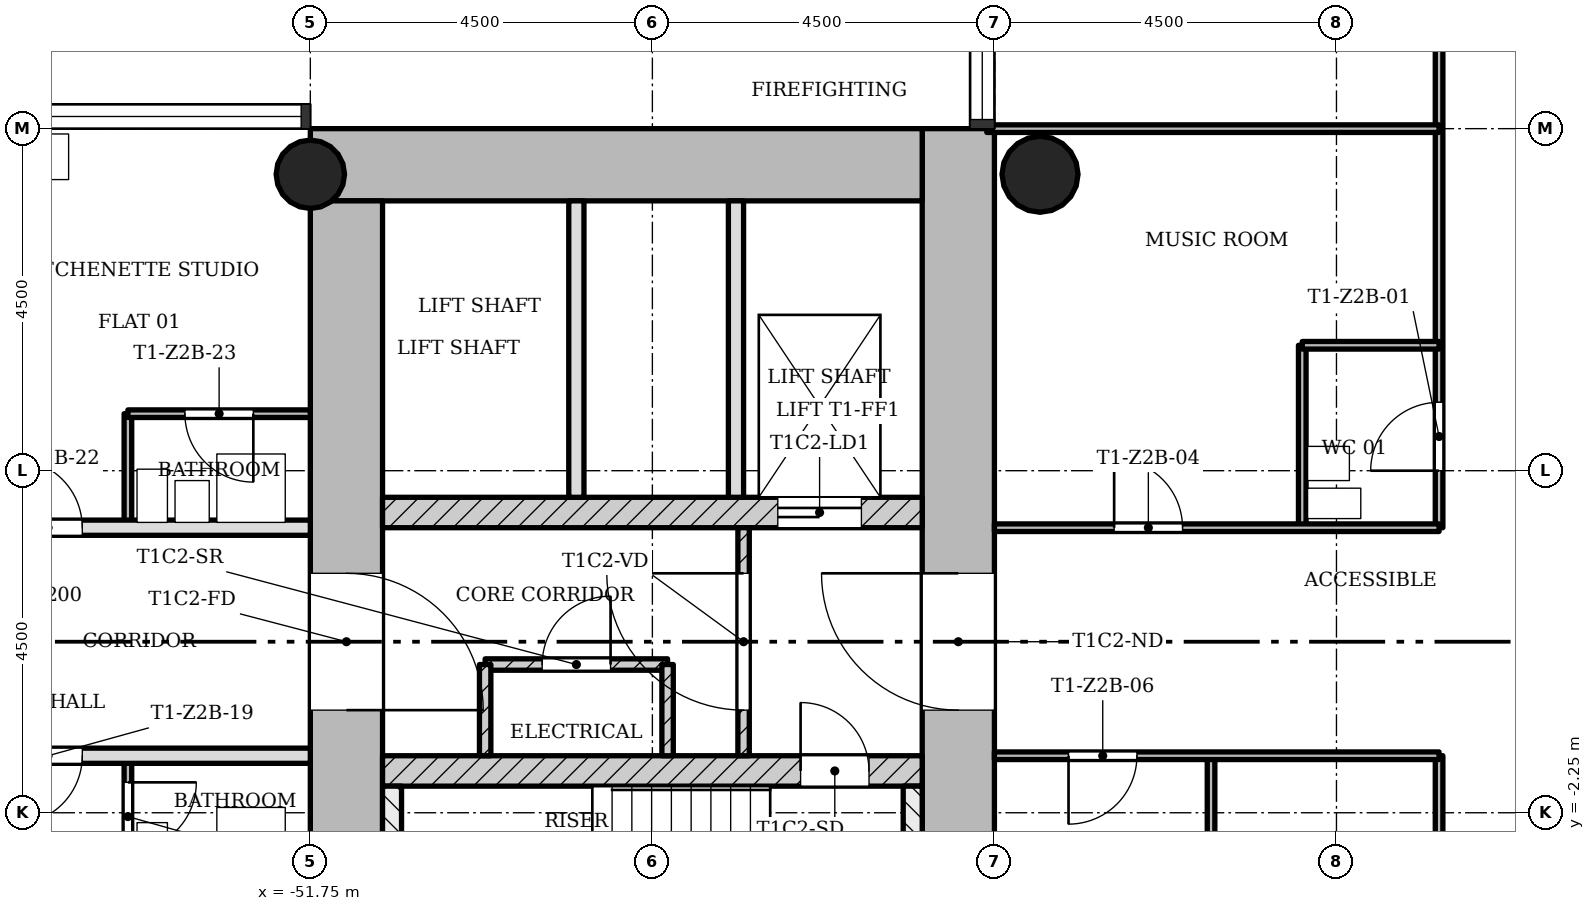
"""IFC4 building model, lengths in metres.
Left out: names, types, materials, properties, quantities, classifications, styles, units other than length and angle.
Written with IfcOpenShell. Run it as: python <this file> out.ifc"""

import sys

from ifc_helpers import new_model, si_unit, direction, frame, frame_2d, origin, origin_2d, place, context, subcontext, project, spatial, rectangle, hollow_circle, extrude, element, fill, save


model = new_model("IFC4")
c1 = context("Model", 3, precision=1e-05, world=origin(), true_north=direction((0.0, 1.0)))
c2 = subcontext(c1, "Body", "Model", "MODEL_VIEW")
j1 = project(units=[si_unit("LENGTHUNIT", "METRE"), si_unit("PLANEANGLEUNIT", "RADIAN")], contexts=[c1])
p1 = place(None, origin())
s1 = spatial("IfcSite", under=j1, at=p1, CompositionType="ELEMENT")
p2 = place(p1, origin())
s2 = spatial("IfcBuilding", under=s1, at=p2, CompositionType="ELEMENT")
p3 = place(p2, frame((0.0, 0.0, 76.6)))
s3 = spatial("IfcBuildingStorey", under=s2, at=p3, CompositionType="ELEMENT", Elevation=76.6)
p4 = place(p3, frame((-43.225, -5.8, 0.0), z_axis=(0.0, 0.0, 1.0), x_axis=(0.0, 1.0, 0.0)))
e1 = element("IfcWall", 1, at=p4, inside=s3, PredefinedType="SHEAR", context=c2, shape_type="SweptSolid", body=[
    extrude(rectangle(XDim=12.55, YDim=0.95, at=frame_2d((6.275, 0.0))), origin(), (0.0, 0.0, 1.0), 3.4),
])
p5 = place(p4, frame((4.9, 0.0, 0.0)))
e2 = element("IfcOpeningElement", 2, at=p5, cuts=e1, PredefinedType="OPENING", context=c2, shape_type="SweptSolid", body=[
    extrude(rectangle(XDim=1.8, YDim=2.1, at=frame_2d((0.9, 1.05))), frame((0.0, 0.485, 0.0), z_axis=(0.0, -1.0, 0.0), x_axis=(1.0, 0.0, 0.0)), (0.0, 0.0, 1.0), 0.97),
])
p6 = place(p3, frame((-43.7, 6.275, 0.0), z_axis=(0.0, 0.0, 1.0), x_axis=(-1.0, 0.0, 0.0)))
e3 = element("IfcWall", 3, at=p6, inside=s3, PredefinedType="SHEAR", context=c2, shape_type="SweptSolid", body=[
    extrude(rectangle(XDim=8.05, YDim=0.95, at=frame_2d((4.025, 0.0))), origin(), (0.0, 0.0, 1.0), 3.4),
])
p7 = place(p3, frame((-51.275, 5.8, 0.0), z_axis=(0.0, 0.0, 1.0), x_axis=(0.0, -1.0, 0.0)))
e4 = element("IfcWall", 4, at=p7, inside=s3, PredefinedType="SHEAR", context=c2, shape_type="SweptSolid", body=[
    extrude(rectangle(XDim=12.55, YDim=0.95, at=frame_2d((6.275, 0.0))), origin(), (0.0, 0.0, 1.0), 3.4),
])
p8 = place(p7, frame((4.9, 0.0, 0.0)))
e5 = element("IfcOpeningElement", 5, at=p8, cuts=e4, PredefinedType="OPENING", context=c2, shape_type="SweptSolid", body=[
    extrude(rectangle(XDim=1.8, YDim=2.1, at=frame_2d((0.9, 1.05))), frame((0.0, 0.485, 0.0), z_axis=(0.0, -1.0, 0.0), x_axis=(1.0, 0.0, 0.0)), (0.0, 0.0, 1.0), 0.97),
])
p9 = place(p3, frame((-50.8, -1.7, 0.0), z_axis=(0.0, 0.0, 1.0), x_axis=(1.0, 0.0, 0.0)))
e6 = element("IfcWall", 6, at=p9, inside=s3, PredefinedType="SHEAR", context=c2, shape_type="SweptSolid", body=[
    extrude(rectangle(XDim=7.1, YDim=0.4, at=frame_2d((3.55, 0.0))), origin(), (0.0, 0.0, 1.0), 3.4),
])
p10 = place(p9, frame((5.5, 0.0, 0.0)))
e7 = element("IfcOpeningElement", 7, at=p10, cuts=e6, PredefinedType="OPENING", context=c2, shape_type="SweptSolid", body=[
    extrude(rectangle(XDim=0.9, YDim=2.1, at=frame_2d((0.45, 1.05))), frame((0.0, 0.21, 0.0), z_axis=(0.0, -1.0, 0.0), x_axis=(1.0, 0.0, 0.0)), (0.0, 0.0, 1.0), 0.42),
])
p11 = place(p3, frame((-50.8, 1.7, 0.0), z_axis=(0.0, 0.0, 1.0), x_axis=(1.0, 0.0, 0.0)))
e8 = element("IfcWall", 8, at=p11, inside=s3, PredefinedType="SHEAR", context=c2, shape_type="SweptSolid", body=[
    extrude(rectangle(XDim=7.1, YDim=0.4, at=frame_2d((3.55, 0.0))), origin(), (0.0, 0.0, 1.0), 3.4),
])
p12 = place(p11, frame((5.2, 0.0, 0.0)))
e9 = element("IfcOpeningElement", 9, at=p12, cuts=e8, PredefinedType="OPENING", context=c2, shape_type="SweptSolid", body=[
    extrude(rectangle(XDim=1.1, YDim=2.1, at=frame_2d((0.55, 1.05))), frame((0.0, 0.21, 0.0), z_axis=(0.0, -1.0, 0.0), x_axis=(1.0, 0.0, 0.0)), (0.0, 0.0, 1.0), 0.42),
])
p13 = place(p3, frame((-51.75, 6.15, 0.0), z_axis=(0.0, 0.0, 1.0), x_axis=(1.0, 0.0, 0.0)))
e10 = element("IfcColumn", 10, at=p13, inside=s3, PredefinedType="COLUMN", context=c2, shape_type="SweptSolid", body=[
    extrude(hollow_circle(Radius=0.45, WallThickness=0.032, at=origin_2d()), origin(), (0.0, 0.0, 1.0), 3.4),
])
p14 = place(p3, frame((-42.15, 6.15, 0.0), z_axis=(0.0, 0.0, 1.0), x_axis=(1.0, 0.0, 0.0)))
e11 = element("IfcColumn", 11, at=p14, inside=s3, PredefinedType="COLUMN", context=c2, shape_type="SweptSolid", body=[
    extrude(hollow_circle(Radius=0.5, WallThickness=0.036, at=origin_2d()), origin(), (0.0, 0.0, 1.0), 3.4),
])
p15 = place(p3, frame((-46.05, 1.5, 0.0), z_axis=(0.0, 0.0, 1.0), x_axis=(0.0, -1.0, 0.0)))
e12 = element("IfcWall", 12, at=p15, inside=s3, PredefinedType="PARTITIONING", context=c2, shape_type="SweptSolid", body=[
    extrude(rectangle(XDim=3.0, YDim=0.15, at=frame_2d((1.5, 0.0))), origin(), (0.0, 0.0, 1.0), 3.0),
])
p16 = place(p15, frame((0.6, 0.0, 0.0)))
e13 = element("IfcOpeningElement", 13, at=p16, cuts=e12, PredefinedType="OPENING", context=c2, shape_type="SweptSolid", body=[
    extrude(rectangle(XDim=1.8, YDim=2.1, at=frame_2d((0.9, 1.05))), frame((0.0, 0.085, 0.0), z_axis=(0.0, -1.0, 0.0), x_axis=(1.0, 0.0, 0.0)), (0.0, 0.0, 1.0), 0.17),
])
for number, where, z_axis, x_axis in (
    (14, (-46.15, 5.8, 0.0), (0.0, 0.0, 1.0), (0.0, -1.0, 0.0)),
    (15, (-48.25, 5.8, 0.0), (0.0, 0.0, 1.0), (0.0, -1.0, 0.0)),
):
    element("IfcWall", number, at=place(p3, frame(where, z_axis=z_axis, x_axis=x_axis)), inside=s3, PredefinedType="SOLIDWALL", context=c2, shape_type="SweptSolid", body=[
        extrude(rectangle(XDim=3.9, YDim=0.2, at=frame_2d((1.95, 0.0))), origin(), (0.0, 0.0, 1.0), 3.0),
    ])
p17 = place(p3, frame((-47.05, -0.3, 0.0), z_axis=(0.0, 0.0, 1.0), x_axis=(-1.0, 0.0, 0.0)))
e16 = element("IfcWall", 16, at=p17, inside=s3, PredefinedType="PARTITIONING", context=c2, shape_type="SweptSolid", body=[
    extrude(rectangle(XDim=2.4, YDim=0.15, at=frame_2d((1.2, 0.0))), origin(), (0.0, 0.0, 1.0), 3.0),
])
p18 = place(p17, frame((0.75, 0.0, 0.0)))
e17 = element("IfcOpeningElement", 17, at=p18, cuts=e16, PredefinedType="OPENING", context=c2, shape_type="SweptSolid", body=[
    extrude(rectangle(XDim=0.9, YDim=2.1, at=frame_2d((0.45, 1.05))), frame((0.0, 0.085, 0.0), z_axis=(0.0, -1.0, 0.0), x_axis=(1.0, 0.0, 0.0)), (0.0, 0.0, 1.0), 0.17),
])
for number, where, z_axis, x_axis in (
    (18, (-47.05, -0.3, 0.0), (0.0, 0.0, 1.0), (0.0, -1.0, 0.0)),
    (19, (-49.45, -0.3, 0.0), (0.0, 0.0, 1.0), (0.0, -1.0, 0.0)),
):
    element("IfcWall", number, at=place(p3, frame(where, z_axis=z_axis, x_axis=x_axis)), inside=s3, PredefinedType="PARTITIONING", context=c2, shape_type="SweptSolid", body=[
        extrude(rectangle(XDim=1.2, YDim=0.15, at=frame_2d((0.6, 0.0))), origin(), (0.0, 0.0, 1.0), 3.0),
    ])
p19 = place(p3, frame((-54.15, -3.15, 0.0), z_axis=(0.0, 0.0, 1.0), x_axis=(0.0, 1.0, 0.0)))
e20 = element("IfcWall", 20, at=p19, inside=s3, PredefinedType="PARTITIONING", context=c2, shape_type="SweptSolid", body=[
    extrude(rectangle(XDim=1.65, YDim=0.1, at=frame_2d((0.825, 0.0))), origin(), (0.0, 0.0, 1.0), 3.0),
])
p20 = place(p19, frame((0.4, 0.0, 0.0)))
e21 = element("IfcOpeningElement", 21, at=p20, cuts=e20, PredefinedType="OPENING", context=c2, shape_type="SweptSolid", body=[
    extrude(rectangle(XDim=0.9, YDim=2.1, at=frame_2d((0.45, 1.05))), frame((0.0, 0.06, 0.0), z_axis=(0.0, -1.0, 0.0), x_axis=(1.0, 0.0, 0.0)), (0.0, 0.0, 1.0), 0.12),
])
p21 = place(p3, frame((-54.15, 1.5, 0.0), z_axis=(0.0, 0.0, 1.0), x_axis=(0.0, 1.0, 0.0)))
e22 = element("IfcWall", 22, at=p21, inside=s3, PredefinedType="PARTITIONING", context=c2, shape_type="SweptSolid", body=[
    extrude(rectangle(XDim=1.5, YDim=0.1, at=frame_2d((0.75, 0.0))), origin(), (0.0, 0.0, 1.0), 3.0),
])
p22 = place(p3, frame((-39.9, -6.75, 0.0), z_axis=(0.0, 0.0, 1.0), x_axis=(0.0, 1.0, 0.0)))
e23 = element("IfcWall", 23, at=p22, inside=s3, PredefinedType="PARTITIONING", context=c2, shape_type="SweptSolid", body=[
    extrude(rectangle(XDim=5.25, YDim=0.1, at=frame_2d((2.625, 0.0))), origin(), (0.0, 0.0, 1.0), 3.0),
])
p23 = place(p3, frame((-38.7, 1.5, 0.0), z_axis=(0.0, 0.0, 1.0), x_axis=(0.0, 1.0, 0.0)))
e24 = element("IfcWall", 24, at=p23, inside=s3, PredefinedType="PARTITIONING", context=c2, shape_type="SweptSolid", body=[
    extrude(rectangle(XDim=2.4, YDim=0.1, at=frame_2d((1.2, 0.0))), origin(), (0.0, 0.0, 1.0), 3.0),
])
p24 = place(p3, frame((-36.9, -6.75, 0.0), z_axis=(0.0, 0.0, 1.0), x_axis=(0.0, 1.0, 0.0)))
e25 = element("IfcWall", 25, at=p24, inside=s3, PredefinedType="PARTITIONING", context=c2, shape_type="SweptSolid", body=[
    extrude(rectangle(XDim=5.25, YDim=0.1, at=frame_2d((2.625, 0.0))), origin(), (0.0, 0.0, 1.0), 3.0),
])
p25 = place(p24, frame((2.175, 0.0, 0.0)))
e26 = element("IfcOpeningElement", 26, at=p25, cuts=e25, PredefinedType="OPENING", context=c2, shape_type="SweptSolid", body=[
    extrude(rectangle(XDim=0.9, YDim=2.1, at=frame_2d((0.45, 1.05))), frame((0.0, 0.06, 0.0), z_axis=(0.0, -1.0, 0.0), x_axis=(1.0, 0.0, 0.0)), (0.0, 0.0, 1.0), 0.12),
])
p26 = place(p3, frame((-36.9, 1.5, 0.0), z_axis=(0.0, 0.0, 1.0), x_axis=(0.0, 1.0, 0.0)))
e27 = element("IfcWall", 27, at=p26, inside=s3, PredefinedType="PARTITIONING", context=c2, shape_type="SweptSolid", body=[
    extrude(rectangle(XDim=9.75, YDim=0.1, at=frame_2d((4.875, 0.0))), origin(), (0.0, 0.0, 1.0), 3.0),
])
p27 = place(p26, frame((0.75, 0.0, 0.0)))
e28 = element("IfcOpeningElement", 28, at=p27, cuts=e27, PredefinedType="OPENING", context=c2, shape_type="SweptSolid", body=[
    extrude(rectangle(XDim=0.9, YDim=2.1, at=frame_2d((0.45, 1.05))), frame((0.0, 0.06, 0.0), z_axis=(0.0, -1.0, 0.0), x_axis=(1.0, 0.0, 0.0)), (0.0, 0.0, 1.0), 0.12),
])
p28 = place(p26, frame((7.05, 0.0, 0.0)))
e29 = element("IfcOpeningElement", 29, at=p28, cuts=e27, PredefinedType="OPENING", context=c2, shape_type="SweptSolid", body=[
    extrude(rectangle(XDim=0.9, YDim=2.1, at=frame_2d((0.45, 1.05))), frame((0.0, 0.06, 0.0), z_axis=(0.0, -1.0, 0.0), x_axis=(1.0, 0.0, 0.0)), (0.0, 0.0, 1.0), 0.12),
])
p29 = place(p3, frame((-42.75, -1.5, 0.0), z_axis=(0.0, 0.0, 1.0), x_axis=(1.0, 0.0, 0.0)))
e30 = element("IfcWall", 30, at=p29, inside=s3, PredefinedType="PARTITIONING", context=c2, shape_type="SweptSolid", body=[
    extrude(rectangle(XDim=5.85, YDim=0.1, at=frame_2d((2.925, 0.0))), origin(), (0.0, 0.0, 1.0), 3.0),
])
p30 = place(p29, frame((0.975, 0.0, 0.0)))
e31 = element("IfcOpeningElement", 31, at=p30, cuts=e30, PredefinedType="OPENING", context=c2, shape_type="SweptSolid", body=[
    extrude(rectangle(XDim=0.9, YDim=2.1, at=frame_2d((0.45, 1.05))), frame((0.0, 0.06, 0.0), z_axis=(0.0, -1.0, 0.0), x_axis=(1.0, 0.0, 0.0)), (0.0, 0.0, 1.0), 0.12),
])
p31 = place(p3, frame((-56.25, -1.5, 0.0), z_axis=(0.0, 0.0, 1.0), x_axis=(1.0, 0.0, 0.0)))
e32 = element("IfcWall", 32, at=p31, inside=s3, PredefinedType="SOLIDWALL", context=c2, shape_type="SweptSolid", body=[
    extrude(rectangle(XDim=4.5, YDim=0.2, at=frame_2d((2.25, 0.0))), origin(), (0.0, 0.0, 1.0), 3.0),
])
p32 = place(p31, frame((0.6, 0.0, 0.0)))
e33 = element("IfcOpeningElement", 33, at=p32, cuts=e32, PredefinedType="OPENING", context=c2, shape_type="SweptSolid", body=[
    extrude(rectangle(XDim=0.9, YDim=2.1, at=frame_2d((0.45, 1.05))), frame((0.0, 0.11, 0.0), z_axis=(0.0, -1.0, 0.0), x_axis=(1.0, 0.0, 0.0)), (0.0, 0.0, 1.0), 0.22),
])
p33 = place(p3, frame((-42.75, 1.5, 0.0), z_axis=(0.0, 0.0, 1.0), x_axis=(1.0, 0.0, 0.0)))
e34 = element("IfcWall", 34, at=p33, inside=s3, PredefinedType="PARTITIONING", context=c2, shape_type="SweptSolid", body=[
    extrude(rectangle(XDim=5.85, YDim=0.1, at=frame_2d((2.925, 0.0))), origin(), (0.0, 0.0, 1.0), 3.0),
])
p34 = place(p33, frame((1.575, 0.0, 0.0)))
e35 = element("IfcOpeningElement", 35, at=p34, cuts=e34, PredefinedType="OPENING", context=c2, shape_type="SweptSolid", body=[
    extrude(rectangle(XDim=0.9, YDim=2.1, at=frame_2d((0.45, 1.05))), frame((0.0, 0.06, 0.0), z_axis=(0.0, -1.0, 0.0), x_axis=(1.0, 0.0, 0.0)), (0.0, 0.0, 1.0), 0.12),
])
p35 = place(p3, frame((-56.25, 1.5, 0.0), z_axis=(0.0, 0.0, 1.0), x_axis=(1.0, 0.0, 0.0)))
e36 = element("IfcWall", 36, at=p35, inside=s3, PredefinedType="SOLIDWALL", context=c2, shape_type="SweptSolid", body=[
    extrude(rectangle(XDim=4.5, YDim=0.2, at=frame_2d((2.25, 0.0))), origin(), (0.0, 0.0, 1.0), 3.0),
])
p36 = place(p35, frame((0.6, 0.0, 0.0)))
e37 = element("IfcOpeningElement", 37, at=p36, cuts=e36, PredefinedType="OPENING", context=c2, shape_type="SweptSolid", body=[
    extrude(rectangle(XDim=0.9, YDim=2.1, at=frame_2d((0.45, 1.05))), frame((0.0, 0.11, 0.0), z_axis=(0.0, -1.0, 0.0), x_axis=(1.0, 0.0, 0.0)), (0.0, 0.0, 1.0), 0.22),
])
p37 = place(p3, frame((-54.15, 3.0, 0.0), z_axis=(0.0, 0.0, 1.0), x_axis=(1.0, 0.0, 0.0)))
e38 = element("IfcWall", 38, at=p37, inside=s3, PredefinedType="PARTITIONING", context=c2, shape_type="SweptSolid", body=[
    extrude(rectangle(XDim=2.4, YDim=0.1, at=frame_2d((1.2, 0.0))), origin(), (0.0, 0.0, 1.0), 3.0),
])
p38 = place(p37, frame((0.75, 0.0, 0.0)))
e39 = element("IfcOpeningElement", 39, at=p38, cuts=e38, PredefinedType="OPENING", context=c2, shape_type="SweptSolid", body=[
    extrude(rectangle(XDim=0.9, YDim=2.1, at=frame_2d((0.45, 1.05))), frame((0.0, 0.06, 0.0), z_axis=(0.0, -1.0, 0.0), x_axis=(1.0, 0.0, 0.0)), (0.0, 0.0, 1.0), 0.12),
])
p39 = place(p3, frame((-38.7, 3.9, 0.0), z_axis=(0.0, 0.0, 1.0), x_axis=(1.0, 0.0, 0.0)))
e40 = element("IfcWall", 40, at=p39, inside=s3, PredefinedType="PARTITIONING", context=c2, shape_type="SweptSolid", body=[
    extrude(rectangle(XDim=1.8, YDim=0.1, at=frame_2d((0.9, 0.0))), origin(), (0.0, 0.0, 1.0), 3.0),
])
p40 = place(p3, frame((-42.85, 6.75, 0.0), z_axis=(0.0, 0.0, 1.0), x_axis=(1.0, 0.0, 0.0)))
e41 = element("IfcWall", 41, at=p40, inside=s3, PredefinedType="PARTITIONING", context=c2, shape_type="SweptSolid", body=[
    extrude(rectangle(XDim=5.95, YDim=0.1, at=frame_2d((2.975, 0.0))), origin(), (0.0, 0.0, 1.0), 3.0),
])
for number, where, z_axis, x_axis in (
    (42, (-50.675, -1.9, 0.0), (0.0, 0.0, 1.0), (0.0, -1.0, 0.0)),
    (43, (-43.825, -1.9, 0.0), (0.0, 0.0, 1.0), (0.0, -1.0, 0.0)),
):
    element("IfcWall", number, at=place(p3, frame(where, z_axis=z_axis, x_axis=x_axis)), inside=s3, PredefinedType="SHEAR", context=c2, shape_type="SweptSolid", body=[
        extrude(rectangle(XDim=3.9, YDim=0.25, at=frame_2d((1.95, 0.0))), origin(), (0.0, 0.0, 1.0), 3.4),
    ])
p41 = place(p16, origin())
e44 = element("IfcDoor", 44, at=p41, inside=s3, OperationType="SINGLE_SWING_LEFT", PredefinedType="DOOR", context=c2, shape_type="SweptSolid", body=[
    extrude(rectangle(XDim=1.8, YDim=2.1, at=frame_2d((0.9, 1.05))), frame((0.0, 0.025, 0.0), z_axis=(0.0, -1.0, 0.0), x_axis=(1.0, 0.0, 0.0)), (0.0, 0.0, 1.0), 0.05),
])
fill(e13, e44)
p42 = place(p18, origin())
e45 = element("IfcDoor", 45, at=p42, inside=s3, OperationType="SINGLE_SWING_LEFT", PredefinedType="DOOR", context=c2, shape_type="SweptSolid", body=[
    extrude(rectangle(XDim=0.9, YDim=2.1, at=frame_2d((0.45, 1.05))), frame((0.0, 0.025, 0.0), z_axis=(0.0, -1.0, 0.0), x_axis=(1.0, 0.0, 0.0)), (0.0, 0.0, 1.0), 0.05),
])
fill(e17, e45)
p43 = place(p27, origin())
e46 = element("IfcDoor", 46, at=p43, inside=s3, OperationType="SINGLE_SWING_RIGHT", PredefinedType="DOOR", context=c2, shape_type="SweptSolid", body=[
    extrude(rectangle(XDim=0.9, YDim=2.1, at=frame_2d((0.45, 1.05))), frame((0.0, 0.025, 0.0), z_axis=(0.0, -1.0, 0.0), x_axis=(1.0, 0.0, 0.0)), (0.0, 0.0, 1.0), 0.05),
])
fill(e28, e46)
p44 = place(p34, origin())
e47 = element("IfcDoor", 47, at=p44, inside=s3, OperationType="SINGLE_SWING_RIGHT", PredefinedType="DOOR", context=c2, shape_type="SweptSolid", body=[
    extrude(rectangle(XDim=0.9, YDim=2.1, at=frame_2d((0.45, 1.05))), frame((0.0, 0.025, 0.0), z_axis=(0.0, -1.0, 0.0), x_axis=(1.0, 0.0, 0.0)), (0.0, 0.0, 1.0), 0.05),
])
fill(e35, e47)
p45 = place(p30, origin())
e48 = element("IfcDoor", 48, at=p45, inside=s3, OperationType="SINGLE_SWING_LEFT", PredefinedType="DOOR", context=c2, shape_type="SweptSolid", body=[
    extrude(rectangle(XDim=0.9, YDim=2.1, at=frame_2d((0.45, 1.05))), frame((0.0, 0.025, 0.0), z_axis=(0.0, -1.0, 0.0), x_axis=(1.0, 0.0, 0.0)), (0.0, 0.0, 1.0), 0.05),
])
fill(e31, e48)
p46 = place(p32, origin())
e49 = element("IfcDoor", 49, at=p46, inside=s3, OperationType="SINGLE_SWING_LEFT", PredefinedType="DOOR", context=c2, shape_type="SweptSolid", body=[
    extrude(rectangle(XDim=0.9, YDim=2.1, at=frame_2d((0.45, 1.05))), frame((0.0, 0.025, 0.0), z_axis=(0.0, -1.0, 0.0), x_axis=(1.0, 0.0, 0.0)), (0.0, 0.0, 1.0), 0.05),
])
fill(e33, e49)
p47 = place(p20, origin())
e50 = element("IfcDoor", 50, at=p47, inside=s3, OperationType="SINGLE_SWING_RIGHT", PredefinedType="DOOR", context=c2, shape_type="SweptSolid", body=[
    extrude(rectangle(XDim=0.9, YDim=2.1, at=frame_2d((0.45, 1.05))), frame((0.0, 0.025, 0.0), z_axis=(0.0, -1.0, 0.0), x_axis=(1.0, 0.0, 0.0)), (0.0, 0.0, 1.0), 0.05),
])
fill(e21, e50)
p48 = place(p36, origin())
e51 = element("IfcDoor", 51, at=p48, inside=s3, OperationType="SINGLE_SWING_RIGHT", PredefinedType="DOOR", context=c2, shape_type="SweptSolid", body=[
    extrude(rectangle(XDim=0.9, YDim=2.1, at=frame_2d((0.45, 1.05))), frame((0.0, 0.025, 0.0), z_axis=(0.0, -1.0, 0.0), x_axis=(1.0, 0.0, 0.0)), (0.0, 0.0, 1.0), 0.05),
])
fill(e37, e51)
p49 = place(p38, origin())
e52 = element("IfcDoor", 52, at=p49, inside=s3, OperationType="SINGLE_SWING_RIGHT", PredefinedType="DOOR", context=c2, shape_type="SweptSolid", body=[
    extrude(rectangle(XDim=0.9, YDim=2.1, at=frame_2d((0.45, 1.05))), frame((0.0, 0.025, 0.0), z_axis=(0.0, -1.0, 0.0), x_axis=(1.0, 0.0, 0.0)), (0.0, 0.0, 1.0), 0.05),
])
fill(e39, e52)
p50 = place(p10, origin())
e53 = element("IfcDoor", 53, at=p50, inside=s3, OperationType="SINGLE_SWING_RIGHT", PredefinedType="DOOR", context=c2, shape_type="SweptSolid", body=[
    extrude(rectangle(XDim=0.9, YDim=2.1, at=frame_2d((0.45, 1.05))), frame((0.0, 0.025, 0.0), z_axis=(0.0, -1.0, 0.0), x_axis=(1.0, 0.0, 0.0)), (0.0, 0.0, 1.0), 0.05),
])
fill(e7, e53)
p51 = place(p12, origin())
e54 = element("IfcDoor", 54, at=p51, inside=s3, OperationType="SLIDING_TO_LEFT", PredefinedType="DOOR", context=c2, shape_type="SweptSolid", body=[
    extrude(rectangle(XDim=1.1, YDim=2.1, at=frame_2d((0.55, 1.05))), frame((0.0, 0.025, 0.0), z_axis=(0.0, -1.0, 0.0), x_axis=(1.0, 0.0, 0.0)), (0.0, 0.0, 1.0), 0.05),
])
fill(e9, e54)
p52 = place(p5, origin())
e55 = element("IfcDoor", 55, at=p52, inside=s3, OperationType="SINGLE_SWING_LEFT", PredefinedType="DOOR", context=c2, shape_type="SweptSolid", body=[
    extrude(rectangle(XDim=1.8, YDim=2.1, at=frame_2d((0.9, 1.05))), frame((0.0, 0.025, 0.0), z_axis=(0.0, -1.0, 0.0), x_axis=(1.0, 0.0, 0.0)), (0.0, 0.0, 1.0), 0.05),
])
fill(e2, e55)
p53 = place(p8, origin())
e56 = element("IfcDoor", 56, at=p53, inside=s3, OperationType="SINGLE_SWING_LEFT", PredefinedType="DOOR", context=c2, shape_type="SweptSolid", body=[
    extrude(rectangle(XDim=1.8, YDim=2.1, at=frame_2d((0.9, 1.05))), frame((0.0, 0.025, 0.0), z_axis=(0.0, -1.0, 0.0), x_axis=(1.0, 0.0, 0.0)), (0.0, 0.0, 1.0), 0.05),
])
fill(e5, e56)
save(model, sys.argv[1])
